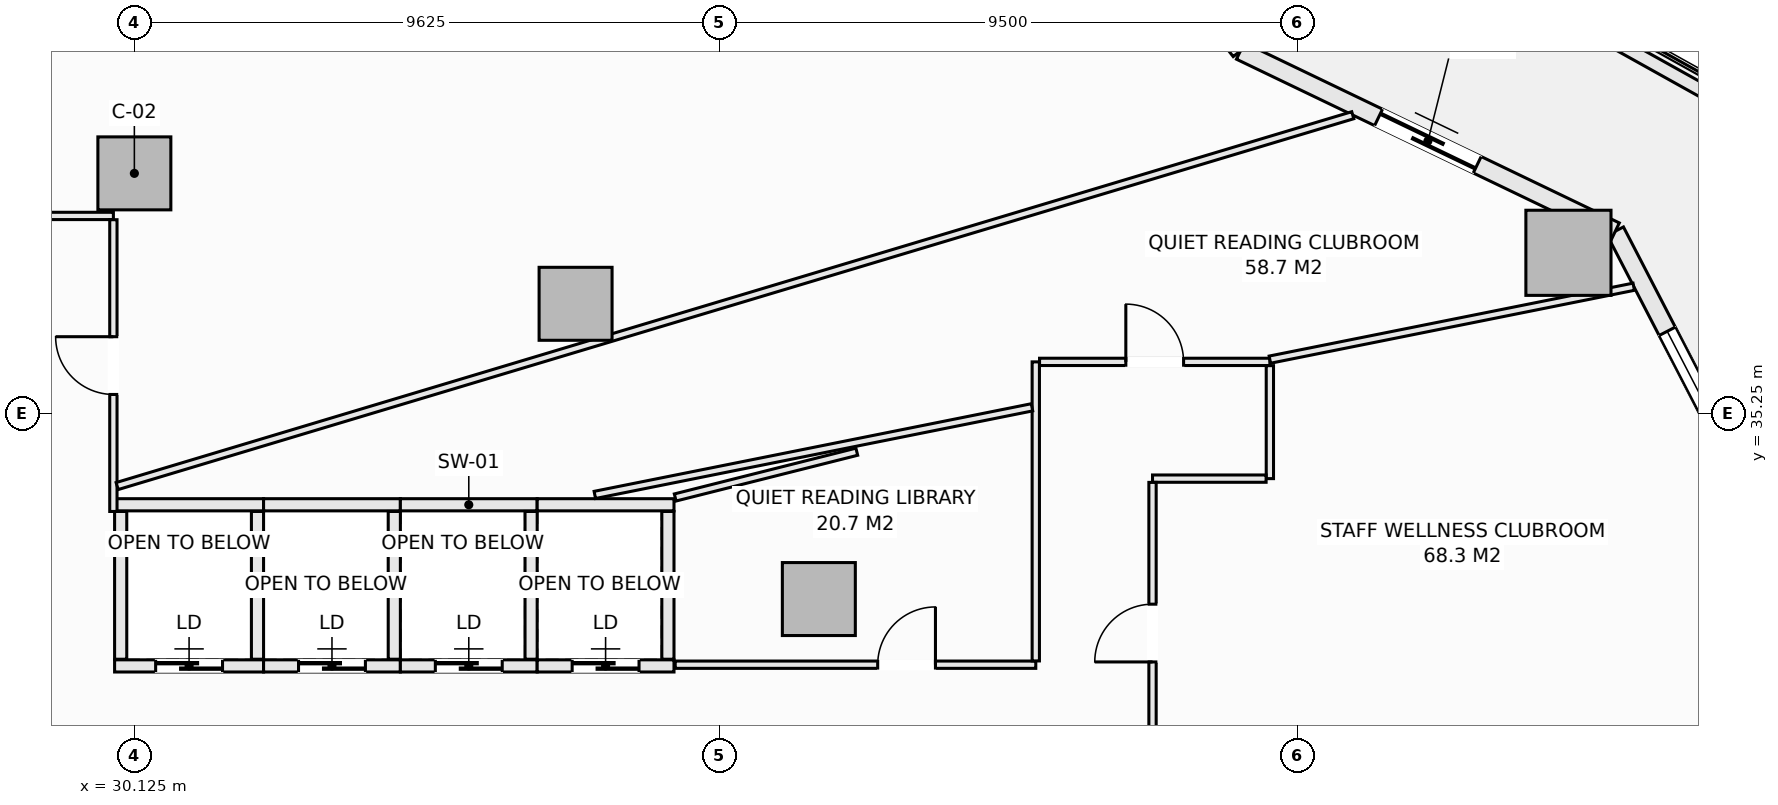
"""IFC4 building model, lengths in metres.
Left out: names, types, materials, properties, quantities, classifications, styles, units other than length and angle.
Written with IfcOpenShell. Run it as: python <this file> out.ifc"""

import sys

from ifc_helpers import new_model, si_unit, direction, frame, frame_2d, origin, origin_2d, place, context, subcontext, project, spatial, rectangle, extrude, element, fill, save


model = new_model("IFC4")
c1 = context("Model", 3, precision=1e-05, world=origin(), true_north=direction((0.0, 1.0)))
c2 = subcontext(c1, "Body", "Model", "MODEL_VIEW")
j1 = project(units=[si_unit("LENGTHUNIT", "METRE"), si_unit("PLANEANGLEUNIT", "RADIAN")], contexts=[c1])
p1 = place(None, origin())
s1 = spatial("IfcSite", under=j1, at=p1, CompositionType="ELEMENT")
p2 = place(p1, origin())
s2 = spatial("IfcBuilding", under=s1, at=p2, CompositionType="ELEMENT")
p3 = place(p2, frame((0.0, 0.0, 45.75)))
s3 = spatial("IfcBuildingStorey", under=s2, at=p3, CompositionType="ELEMENT", Elevation=45.75)
p4 = place(p3, frame((53.71, 37.894, -0.28), z_axis=(0.0, 0.0, 1.0), x_axis=(1.0, 0.0, 0.0)))
e1 = element("IfcColumn", 1, at=p4, inside=s3, PredefinedType="COLUMN", context=c2, shape_type="SweptSolid", body=[
    extrude(rectangle(XDim=1.4, YDim=1.4, at=origin_2d()), origin(), (0.0, 0.0, 1.0), 3.85),
])
for number, where, z_axis, x_axis in (
    (2, (41.382, 32.199, -0.28), (0.0, 0.0, 1.0), (1.0, 0.0, 0.0)),
    (3, (37.382, 37.055, -0.28), (0.0, 0.0, 1.0), (1.0, 0.0, 0.0)),
    (4, (30.125, 39.2, -0.28), (0.0, 0.0, 1.0), (1.0, 0.0, 0.0)),
):
    element("IfcColumn", number, at=place(p3, frame(where, z_axis=z_axis, x_axis=x_axis)), inside=s3, PredefinedType="COLUMN", context=c2, shape_type="SweptSolid", body=[
        extrude(rectangle(XDim=1.2, YDim=1.2, at=origin_2d()), origin(), (0.0, 0.0, 1.0), 3.85),
    ])
p5 = place(p3, frame((54.482, 38.25, 0.0), z_axis=(0.0, 0.0, 1.0), x_axis=(0.459809804413, -0.88801742312, 0.0)))
e5 = element("IfcWall", 5, at=p5, inside=s3, PredefinedType="SOLIDWALL", context=c2, shape_type="SweptSolid", body=[
    extrude(rectangle(XDim=6.111, YDim=0.3, at=frame_2d((3.055, 0.0))), origin(), (0.0, 0.0, 1.0), 3.093),
])
p6 = place(p5, frame((1.855, 0.0, 0.85)))
e6 = element("IfcOpeningElement", 6, at=p6, cuts=e5, PredefinedType="OPENING", context=c2, shape_type="SweptSolid", body=[
    extrude(rectangle(XDim=2.4, YDim=1.9, at=frame_2d((1.2, 0.95))), frame((0.0, 0.16, 0.0), z_axis=(0.0, -1.0, 0.0), x_axis=(1.0, 0.0, 0.0)), (0.0, 0.0, 1.0), 0.32),
])
p7 = place(p3, frame((48.315, 41.213, 0.0), z_axis=(0.0, 0.0, 1.0), x_axis=(0.901360393999, -0.433069786673, 0.0)))
e7 = element("IfcWall", 7, at=p7, inside=s3, PredefinedType="SOLIDWALL", context=c2, shape_type="SweptSolid", body=[
    extrude(rectangle(XDim=6.842, YDim=0.3, at=frame_2d((3.421, 0.0))), origin(), (0.0, 0.0, 1.0), 3.093),
])
p8 = place(p7, frame((2.521, 0.0, 0.0)))
e8 = element("IfcOpeningElement", 8, at=p8, cuts=e7, PredefinedType="OPENING", context=c2, shape_type="SweptSolid", body=[
    extrude(rectangle(XDim=1.8, YDim=2.25, at=frame_2d((0.9, 1.125))), frame((0.0, 0.16, 0.0), z_axis=(0.0, -1.0, 0.0), x_axis=(1.0, 0.0, 0.0)), (0.0, 0.0, 1.0), 0.32),
])
p9 = place(p3, frame((44.188, 46.486, 0.0), z_axis=(0.0, 0.0, 1.0), x_axis=(0.616421309777, -0.787416515482, 0.0)))
e9 = element("IfcWall", 9, at=p9, inside=s3, PredefinedType="SOLIDWALL", context=c2, shape_type="SweptSolid", body=[
    extrude(rectangle(XDim=6.696, YDim=0.3, at=frame_2d((3.348, 0.0))), origin(), (0.0, 0.0, 1.0), 3.093),
])
p10 = place(p9, frame((2.148, 0.0, 0.85)))
e10 = element("IfcOpeningElement", 10, at=p10, cuts=e9, PredefinedType="OPENING", context=c2, shape_type="SweptSolid", body=[
    extrude(rectangle(XDim=2.4, YDim=1.9, at=frame_2d((1.2, 0.95))), frame((0.0, 0.16, 0.0), z_axis=(0.0, -1.0, 0.0), x_axis=(1.0, 0.0, 0.0)), (0.0, 0.0, 1.0), 0.32),
])
p11 = place(p3, frame((50.959, 43.322, 0.0), z_axis=(0.0, 0.0, 1.0), x_axis=(0.873500119739, -0.48682393205, 0.0)))
e11 = element("IfcWall", 11, at=p11, inside=s3, PredefinedType="PARAPET", context=c2, shape_type="SweptSolid", body=[
    extrude(rectangle(XDim=7.562, YDim=0.22, at=frame_2d((3.781, 0.0))), origin(), (0.0, 0.0, 1.0), 0.52),
])
p12 = place(p3, frame((29.8, 33.75, 0.0), z_axis=(0.0, 0.0, 1.0), x_axis=(1.0, 0.0, 0.0)))
e12 = element("IfcWall", 12, at=p12, inside=s3, PredefinedType="SOLIDWALL", context=c2, shape_type="SweptSolid", body=[
    extrude(rectangle(XDim=2.45, YDim=0.2, at=frame_2d((1.225, 0.0))), origin(), (0.0, 0.0, 1.0), 3.57),
])
p13 = place(p3, frame((29.8, 31.1, 0.0), z_axis=(0.0, 0.0, 1.0), x_axis=(1.0, 0.0, 0.0)))
e13 = element("IfcWall", 13, at=p13, inside=s3, PredefinedType="SOLIDWALL", context=c2, shape_type="SweptSolid", body=[
    extrude(rectangle(XDim=2.45, YDim=0.2, at=frame_2d((1.225, 0.0))), origin(), (0.0, 0.0, 1.0), 3.57),
])
p14 = place(p13, frame((0.675, 0.0, 0.0)))
e14 = element("IfcOpeningElement", 14, at=p14, cuts=e13, PredefinedType="OPENING", context=c2, shape_type="SweptSolid", body=[
    extrude(rectangle(XDim=1.1, YDim=2.2, at=frame_2d((0.55, 1.1))), frame((0.0, 0.11, 0.0), z_axis=(0.0, -1.0, 0.0), x_axis=(1.0, 0.0, 0.0)), (0.0, 0.0, 1.0), 0.22),
])
for number, where, z_axis, x_axis in (
    (15, (29.9, 31.21, 0.0), (0.0, 0.0, 1.0), (0.0, 1.0, 0.0)),
    (16, (32.15, 31.21, 0.0), (0.0, 0.0, 1.0), (0.0, 1.0, 0.0)),
):
    element("IfcWall", number, at=place(p3, frame(where, z_axis=z_axis, x_axis=x_axis)), inside=s3, PredefinedType="SOLIDWALL", context=c2, shape_type="SweptSolid", body=[
        extrude(rectangle(XDim=2.43, YDim=0.2, at=frame_2d((1.215, 0.0))), origin(), (0.0, 0.0, 1.0), 3.57),
    ])
p15 = place(p3, frame((32.25, 33.75, 0.0), z_axis=(0.0, 0.0, 1.0), x_axis=(1.0, 0.0, 0.0)))
e17 = element("IfcWall", 17, at=p15, inside=s3, PredefinedType="SOLIDWALL", context=c2, shape_type="SweptSolid", body=[
    extrude(rectangle(XDim=2.25, YDim=0.2, at=frame_2d((1.125, 0.0))), origin(), (0.0, 0.0, 1.0), 3.57),
])
p16 = place(p3, frame((32.25, 31.1, 0.0), z_axis=(0.0, 0.0, 1.0), x_axis=(1.0, 0.0, 0.0)))
e18 = element("IfcWall", 18, at=p16, inside=s3, PredefinedType="SOLIDWALL", context=c2, shape_type="SweptSolid", body=[
    extrude(rectangle(XDim=2.25, YDim=0.2, at=frame_2d((1.125, 0.0))), origin(), (0.0, 0.0, 1.0), 3.57),
])
p17 = place(p16, frame((0.575, 0.0, 0.0)))
e19 = element("IfcOpeningElement", 19, at=p17, cuts=e18, PredefinedType="OPENING", context=c2, shape_type="SweptSolid", body=[
    extrude(rectangle(XDim=1.1, YDim=2.2, at=frame_2d((0.55, 1.1))), frame((0.0, 0.11, 0.0), z_axis=(0.0, -1.0, 0.0), x_axis=(1.0, 0.0, 0.0)), (0.0, 0.0, 1.0), 0.22),
])
p18 = place(p3, frame((34.4, 31.21, 0.0), z_axis=(0.0, 0.0, 1.0), x_axis=(0.0, 1.0, 0.0)))
e20 = element("IfcWall", 20, at=p18, inside=s3, PredefinedType="SOLIDWALL", context=c2, shape_type="SweptSolid", body=[
    extrude(rectangle(XDim=2.43, YDim=0.2, at=frame_2d((1.215, 0.0))), origin(), (0.0, 0.0, 1.0), 3.57),
])
p19 = place(p3, frame((34.5, 33.75, 0.0), z_axis=(0.0, 0.0, 1.0), x_axis=(1.0, 0.0, 0.0)))
e21 = element("IfcWall", 21, at=p19, inside=s3, PredefinedType="SOLIDWALL", context=c2, shape_type="SweptSolid", body=[
    extrude(rectangle(XDim=2.25, YDim=0.2, at=frame_2d((1.125, 0.0))), origin(), (0.0, 0.0, 1.0), 3.57),
])
p20 = place(p3, frame((34.5, 31.1, 0.0), z_axis=(0.0, 0.0, 1.0), x_axis=(1.0, 0.0, 0.0)))
e22 = element("IfcWall", 22, at=p20, inside=s3, PredefinedType="SOLIDWALL", context=c2, shape_type="SweptSolid", body=[
    extrude(rectangle(XDim=2.25, YDim=0.2, at=frame_2d((1.125, 0.0))), origin(), (0.0, 0.0, 1.0), 3.57),
])
p21 = place(p20, frame((0.575, 0.0, 0.0)))
e23 = element("IfcOpeningElement", 23, at=p21, cuts=e22, PredefinedType="OPENING", context=c2, shape_type="SweptSolid", body=[
    extrude(rectangle(XDim=1.1, YDim=2.2, at=frame_2d((0.55, 1.1))), frame((0.0, 0.11, 0.0), z_axis=(0.0, -1.0, 0.0), x_axis=(1.0, 0.0, 0.0)), (0.0, 0.0, 1.0), 0.22),
])
p22 = place(p3, frame((36.65, 31.21, 0.0), z_axis=(0.0, 0.0, 1.0), x_axis=(0.0, 1.0, 0.0)))
e24 = element("IfcWall", 24, at=p22, inside=s3, PredefinedType="SOLIDWALL", context=c2, shape_type="SweptSolid", body=[
    extrude(rectangle(XDim=2.43, YDim=0.2, at=frame_2d((1.215, 0.0))), origin(), (0.0, 0.0, 1.0), 3.57),
])
p23 = place(p3, frame((36.75, 33.75, 0.0), z_axis=(0.0, 0.0, 1.0), x_axis=(1.0, 0.0, 0.0)))
e25 = element("IfcWall", 25, at=p23, inside=s3, PredefinedType="SOLIDWALL", context=c2, shape_type="SweptSolid", body=[
    extrude(rectangle(XDim=2.25, YDim=0.2, at=frame_2d((1.125, 0.0))), origin(), (0.0, 0.0, 1.0), 3.57),
])
p24 = place(p3, frame((36.75, 31.1, 0.0), z_axis=(0.0, 0.0, 1.0), x_axis=(1.0, 0.0, 0.0)))
e26 = element("IfcWall", 26, at=p24, inside=s3, PredefinedType="SOLIDWALL", context=c2, shape_type="SweptSolid", body=[
    extrude(rectangle(XDim=2.25, YDim=0.2, at=frame_2d((1.125, 0.0))), origin(), (0.0, 0.0, 1.0), 3.57),
])
p25 = place(p24, frame((0.575, 0.0, 0.0)))
e27 = element("IfcOpeningElement", 27, at=p25, cuts=e26, PredefinedType="OPENING", context=c2, shape_type="SweptSolid", body=[
    extrude(rectangle(XDim=1.1, YDim=2.2, at=frame_2d((0.55, 1.1))), frame((0.0, 0.11, 0.0), z_axis=(0.0, -1.0, 0.0), x_axis=(1.0, 0.0, 0.0)), (0.0, 0.0, 1.0), 0.22),
])
p26 = place(p3, frame((38.9, 31.21, 0.0), z_axis=(0.0, 0.0, 1.0), x_axis=(0.0, 1.0, 0.0)))
e28 = element("IfcWall", 28, at=p26, inside=s3, PredefinedType="SOLIDWALL", context=c2, shape_type="SweptSolid", body=[
    extrude(rectangle(XDim=2.43, YDim=0.2, at=frame_2d((1.215, 0.0))), origin(), (0.0, 0.0, 1.0), 3.57),
])
p27 = place(p3, frame((27.25, 38.5, 0.0), z_axis=(0.0, 0.0, 1.0), x_axis=(1.0, 0.0, 0.0)))
e29 = element("IfcWall", 29, at=p27, inside=s3, PredefinedType="PARTITIONING", context=c2, shape_type="SweptSolid", body=[
    extrude(rectangle(XDim=2.53, YDim=0.12, at=frame_2d((1.265, 0.0))), origin(), (0.0, 0.0, 1.0), 3.57),
])
p28 = place(p3, frame((29.78, 33.64, 0.0), z_axis=(0.0, 0.0, 1.0), x_axis=(0.0, 1.0, 0.0)))
e30 = element("IfcWall", 30, at=p28, inside=s3, PredefinedType="PARTITIONING", context=c2, shape_type="SweptSolid", body=[
    extrude(rectangle(XDim=4.798, YDim=0.12, at=frame_2d((2.399, 0.0))), origin(), (0.0, 0.0, 1.0), 3.57),
])
p29 = place(p28, frame((1.924, 0.0, 0.0)))
e31 = element("IfcOpeningElement", 31, at=p29, cuts=e30, PredefinedType="OPENING", context=c2, shape_type="SweptSolid", body=[
    extrude(rectangle(XDim=0.95, YDim=2.1, at=frame_2d((0.475, 1.05))), frame((0.0, 0.07, 0.0), z_axis=(0.0, -1.0, 0.0), x_axis=(1.0, 0.0, 0.0)), (0.0, 0.0, 1.0), 0.14),
])
p30 = place(p3, frame((39.02, 31.12, 0.0), z_axis=(0.0, 0.0, 1.0), x_axis=(1.0, 0.0, 0.0)))
e32 = element("IfcWall", 32, at=p30, inside=s3, PredefinedType="PARTITIONING", context=c2, shape_type="SweptSolid", body=[
    extrude(rectangle(XDim=5.93, YDim=0.12, at=frame_2d((2.965, 0.0))), origin(), (0.0, 0.0, 1.0), 3.57),
])
p31 = place(p30, frame((3.33, 0.0, 0.0)))
e33 = element("IfcOpeningElement", 33, at=p31, cuts=e32, PredefinedType="OPENING", context=c2, shape_type="SweptSolid", body=[
    extrude(rectangle(XDim=0.95, YDim=2.1, at=frame_2d((0.475, 1.05))), frame((0.0, 0.07, 0.0), z_axis=(0.0, -1.0, 0.0), x_axis=(1.0, 0.0, 0.0)), (0.0, 0.0, 1.0), 0.14),
])
p32 = place(p3, frame((44.95, 31.182, 0.0), z_axis=(0.0, 0.0, 1.0), x_axis=(0.0, 1.0, 0.0)))
e34 = element("IfcWall", 34, at=p32, inside=s3, PredefinedType="PARTITIONING", context=c2, shape_type="SweptSolid", body=[
    extrude(rectangle(XDim=4.918, YDim=0.12, at=frame_2d((2.459, 0.0))), origin(), (0.0, 0.0, 1.0), 3.57),
])
p33 = place(p3, frame((45.012, 36.1, 0.0), z_axis=(0.0, 0.0, 1.0), x_axis=(1.0, 0.0, 0.0)))
e35 = element("IfcWall", 35, at=p33, inside=s3, PredefinedType="PARTITIONING", context=c2, shape_type="SweptSolid", body=[
    extrude(rectangle(XDim=3.788, YDim=0.12, at=frame_2d((1.894, 0.0))), origin(), (0.0, 0.0, 1.0), 3.57),
])
p34 = place(p33, frame((1.419, 0.0, 0.0)))
e36 = element("IfcOpeningElement", 36, at=p34, cuts=e35, PredefinedType="OPENING", context=c2, shape_type="SweptSolid", body=[
    extrude(rectangle(XDim=0.95, YDim=2.1, at=frame_2d((0.475, 1.05))), frame((0.0, 0.07, 0.0), z_axis=(0.0, -1.0, 0.0), x_axis=(1.0, 0.0, 0.0)), (0.0, 0.0, 1.0), 0.14),
])
p35 = place(p3, frame((48.8, 34.18, 0.0), z_axis=(0.0, 0.0, 1.0), x_axis=(0.0, 1.0, 0.0)))
e37 = element("IfcWall", 37, at=p35, inside=s3, PredefinedType="PARTITIONING", context=c2, shape_type="SweptSolid", body=[
    extrude(rectangle(XDim=1.858, YDim=0.12, at=frame_2d((0.929, 0.0))), origin(), (0.0, 0.0, 1.0), 3.57),
])
p36 = place(p3, frame((46.87, 34.18, 0.0), z_axis=(0.0, 0.0, 1.0), x_axis=(1.0, 0.0, 0.0)))
e38 = element("IfcWall", 38, at=p36, inside=s3, PredefinedType="PARTITIONING", context=c2, shape_type="SweptSolid", body=[
    extrude(rectangle(XDim=1.868, YDim=0.12, at=frame_2d((0.934, 0.0))), origin(), (0.0, 0.0, 1.0), 3.57),
])
p37 = place(p3, frame((46.87, 19.32, 0.0), z_axis=(0.0, 0.0, 1.0), x_axis=(0.0, 1.0, 0.0)))
e39 = element("IfcWall", 39, at=p37, inside=s3, PredefinedType="PARTITIONING", context=c2, shape_type="SweptSolid", body=[
    extrude(rectangle(XDim=14.798, YDim=0.12, at=frame_2d((7.399, 0.0))), origin(), (0.0, 0.0, 1.0), 3.57),
])
p38 = place(p37, frame((5.265, 0.0, 0.0)))
e40 = element("IfcOpeningElement", 40, at=p38, cuts=e39, PredefinedType="OPENING", context=c2, shape_type="SweptSolid", body=[
    extrude(rectangle(XDim=0.95, YDim=2.1, at=frame_2d((0.475, 1.05))), frame((0.0, 0.07, 0.0), z_axis=(0.0, -1.0, 0.0), x_axis=(1.0, 0.0, 0.0)), (0.0, 0.0, 1.0), 0.14),
])
p39 = place(p37, frame((11.845, 0.0, 0.0)))
e41 = element("IfcOpeningElement", 41, at=p39, cuts=e39, PredefinedType="OPENING", context=c2, shape_type="SweptSolid", body=[
    extrude(rectangle(XDim=0.95, YDim=2.1, at=frame_2d((0.475, 1.05))), frame((0.0, 0.07, 0.0), z_axis=(0.0, -1.0, 0.0), x_axis=(1.0, 0.0, 0.0)), (0.0, 0.0, 1.0), 0.14),
])
p40 = place(p3, frame((37.698, 33.912, 0.0), z_axis=(0.0, 0.0, 1.0), x_axis=(0.980510182708, 0.196468271245, 0.0)))
e42 = element("IfcWall", 42, at=p40, inside=s3, PredefinedType="PARTITIONING", context=c2, shape_type="SweptSolid", body=[
    extrude(rectangle(XDim=7.333, YDim=0.12, at=frame_2d((3.667, 0.0))), origin(), (0.0, 0.0, 1.0), 3.57),
])
p41 = place(p3, frame((48.8, 36.137, 0.0), z_axis=(0.0, 0.0, 1.0), x_axis=(0.980512919928, 0.196454610165, 0.0)))
e43 = element("IfcWall", 43, at=p41, inside=s3, PredefinedType="PARTITIONING", context=c2, shape_type="SweptSolid", body=[
    extrude(rectangle(XDim=6.103, YDim=0.12, at=frame_2d((3.052, 0.0))), origin(), (0.0, 0.0, 1.0), 3.205),
])
p42 = place(p3, frame((39.02, 33.87, 0.0), z_axis=(0.0, 0.0, 1.0), x_axis=(0.969711955751, 0.244251351837, 0.0)))
e44 = element("IfcWall", 44, at=p42, inside=s3, PredefinedType="PARTITIONING", context=c2, shape_type="SweptSolid", body=[
    extrude(rectangle(XDim=3.08, YDim=0.12, at=frame_2d((1.54, 0.0))), origin(), (0.0, 0.0, 1.0), 3.57),
])
p43 = place(p3, frame((29.842, 34.058, 0.0), z_axis=(0.0, 0.0, 1.0), x_axis=(0.957798094038, 0.287441839435, 0.0)))
e45 = element("IfcWall", 45, at=p43, inside=s3, PredefinedType="PARTITIONING", context=c2, shape_type="SweptSolid", body=[
    extrude(rectangle(XDim=21.217, YDim=0.12, at=frame_2d((10.608, 0.0))), origin(), (0.0, 0.0, 1.0), 3.205),
])
p44 = place(p6, origin())
e46 = element("IfcWindow", 46, at=p44, inside=s3, PartitioningType="SINGLE_PANEL", PredefinedType="WINDOW", context=c2, shape_type="SweptSolid", body=[
    extrude(rectangle(XDim=2.4, YDim=1.9, at=frame_2d((1.2, 0.95))), frame((0.0, 0.03, 0.0), z_axis=(0.0, -1.0, 0.0), x_axis=(1.0, 0.0, 0.0)), (0.0, 0.0, 1.0), 0.06),
])
fill(e6, e46)
p45 = place(p8, origin())
e47 = element("IfcDoor", 47, at=p45, inside=s3, OperationType="SLIDING_TO_LEFT", PredefinedType="DOOR", context=c2, shape_type="SweptSolid", body=[
    extrude(rectangle(XDim=1.8, YDim=2.25, at=frame_2d((0.9, 1.125))), frame((0.0, 0.025, 0.0), z_axis=(0.0, -1.0, 0.0), x_axis=(1.0, 0.0, 0.0)), (0.0, 0.0, 1.0), 0.05),
])
fill(e8, e47)
p46 = place(p14, origin())
e48 = element("IfcDoor", 48, at=p46, inside=s3, OperationType="SLIDING_TO_LEFT", PredefinedType="DOOR", context=c2, shape_type="SweptSolid", body=[
    extrude(rectangle(XDim=1.1, YDim=2.2, at=frame_2d((0.55, 1.1))), frame((0.0, 0.025, 0.0), z_axis=(0.0, -1.0, 0.0), x_axis=(1.0, 0.0, 0.0)), (0.0, 0.0, 1.0), 0.05),
])
fill(e14, e48)
p47 = place(p17, origin())
e49 = element("IfcDoor", 49, at=p47, inside=s3, OperationType="SLIDING_TO_LEFT", PredefinedType="DOOR", context=c2, shape_type="SweptSolid", body=[
    extrude(rectangle(XDim=1.1, YDim=2.2, at=frame_2d((0.55, 1.1))), frame((0.0, 0.025, 0.0), z_axis=(0.0, -1.0, 0.0), x_axis=(1.0, 0.0, 0.0)), (0.0, 0.0, 1.0), 0.05),
])
fill(e19, e49)
p48 = place(p21, origin())
e50 = element("IfcDoor", 50, at=p48, inside=s3, OperationType="SLIDING_TO_LEFT", PredefinedType="DOOR", context=c2, shape_type="SweptSolid", body=[
    extrude(rectangle(XDim=1.1, YDim=2.2, at=frame_2d((0.55, 1.1))), frame((0.0, 0.025, 0.0), z_axis=(0.0, -1.0, 0.0), x_axis=(1.0, 0.0, 0.0)), (0.0, 0.0, 1.0), 0.05),
])
fill(e23, e50)
p49 = place(p25, origin())
e51 = element("IfcDoor", 51, at=p49, inside=s3, OperationType="SLIDING_TO_LEFT", PredefinedType="DOOR", context=c2, shape_type="SweptSolid", body=[
    extrude(rectangle(XDim=1.1, YDim=2.2, at=frame_2d((0.55, 1.1))), frame((0.0, 0.025, 0.0), z_axis=(0.0, -1.0, 0.0), x_axis=(1.0, 0.0, 0.0)), (0.0, 0.0, 1.0), 0.05),
])
fill(e27, e51)
p50 = place(p39, origin())
e52 = element("IfcDoor", 52, at=p50, inside=s3, OperationType="SINGLE_SWING_LEFT", PredefinedType="DOOR", context=c2, shape_type="SweptSolid", body=[
    extrude(rectangle(XDim=0.95, YDim=2.1, at=frame_2d((0.475, 1.05))), frame((0.0, 0.025, 0.0), z_axis=(0.0, -1.0, 0.0), x_axis=(1.0, 0.0, 0.0)), (0.0, 0.0, 1.0), 0.05),
])
fill(e41, e52)
p51 = place(p31, origin())
e53 = element("IfcDoor", 53, at=p51, inside=s3, OperationType="SINGLE_SWING_RIGHT", PredefinedType="DOOR", context=c2, shape_type="SweptSolid", body=[
    extrude(rectangle(XDim=0.95, YDim=2.1, at=frame_2d((0.475, 1.05))), frame((0.0, 0.025, 0.0), z_axis=(0.0, -1.0, 0.0), x_axis=(1.0, 0.0, 0.0)), (0.0, 0.0, 1.0), 0.05),
])
fill(e33, e53)
p52 = place(p34, origin())
e54 = element("IfcDoor", 54, at=p52, inside=s3, OperationType="SINGLE_SWING_LEFT", PredefinedType="DOOR", context=c2, shape_type="SweptSolid", body=[
    extrude(rectangle(XDim=0.95, YDim=2.1, at=frame_2d((0.475, 1.05))), frame((0.0, 0.025, 0.0), z_axis=(0.0, -1.0, 0.0), x_axis=(1.0, 0.0, 0.0)), (0.0, 0.0, 1.0), 0.05),
])
fill(e36, e54)
p53 = place(p29, origin())
e55 = element("IfcDoor", 55, at=p53, inside=s3, OperationType="SINGLE_SWING_RIGHT", PredefinedType="DOOR", context=c2, shape_type="SweptSolid", body=[
    extrude(rectangle(XDim=0.95, YDim=2.1, at=frame_2d((0.475, 1.05))), frame((0.0, 0.025, 0.0), z_axis=(0.0, -1.0, 0.0), x_axis=(1.0, 0.0, 0.0)), (0.0, 0.0, 1.0), 0.05),
])
fill(e31, e55)
save(model, sys.argv[1])
